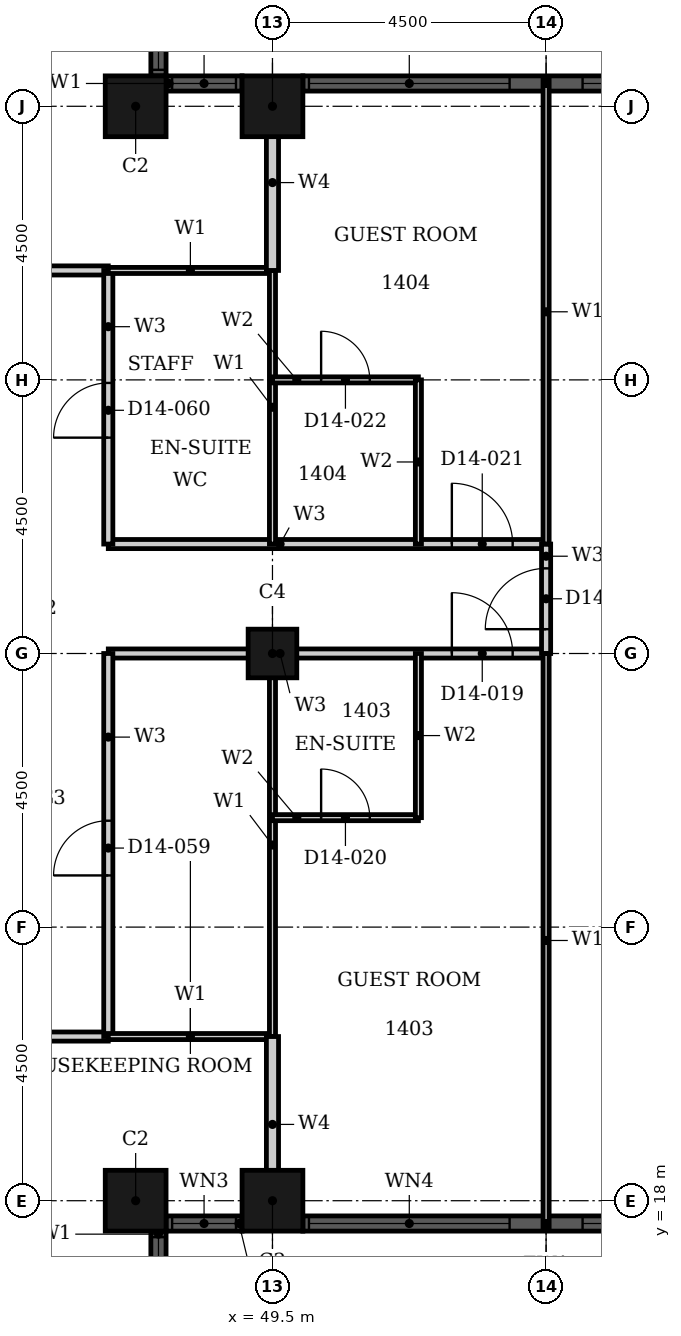
"""IFC4 building model, lengths in metres.
Left out: names, types, materials, properties, quantities, classifications, styles, units other than length and angle.
Written with IfcOpenShell. Run it as: python <this file> out.ifc"""

import sys

from ifc_helpers import new_model, si_unit, direction, frame, frame_2d, origin, origin_2d, place, context, subcontext, project, spatial, rectangle, hollow_rectangle, extrude, element, fill, save


model = new_model("IFC4")
c1 = context("Model", 3, precision=1e-05, world=origin(), true_north=direction((0.0, 1.0)))
c2 = subcontext(c1, "Body", "Model", "MODEL_VIEW")
j1 = project(units=[si_unit("LENGTHUNIT", "METRE"), si_unit("PLANEANGLEUNIT", "RADIAN")], contexts=[c1])
p1 = place(None, origin())
s1 = spatial("IfcSite", under=j1, at=p1, CompositionType="ELEMENT")
p2 = place(p1, origin())
s2 = spatial("IfcBuilding", under=s1, at=p2, CompositionType="ELEMENT")
p3 = place(p2, frame((0.0, 0.0, 63.6)))
s3 = spatial("IfcBuildingStorey", under=s2, at=p3, CompositionType="ELEMENT", Elevation=63.6)
for number, where, z_axis, x_axis in (
    (1, (47.25, 18.0, 0.0), (0.0, 0.0, 1.0), (1.0, 0.0, 0.0)),
    (2, (49.5, 18.0, 0.0), (0.0, 0.0, 1.0), (1.0, 0.0, 0.0)),
    (3, (49.5, 36.0, 0.0), (0.0, 0.0, 1.0), (1.0, 0.0, 0.0)),
    (4, (47.25, 36.0, 0.0), (0.0, 0.0, 1.0), (1.0, 0.0, 0.0)),
):
    element("IfcColumn", number, at=place(p3, frame(where, z_axis=z_axis, x_axis=x_axis)), inside=s3, PredefinedType="COLUMN", context=c2, shape_type="SweptSolid", body=[
        extrude(hollow_rectangle(XDim=1.0, YDim=1.0, WallThickness=0.032, at=origin_2d()), origin(), (0.0, 0.0, 1.0), 3.6),
    ])
p4 = place(p3, frame((49.5, 27.0, 0.0), z_axis=(0.0, 0.0, 1.0), x_axis=(1.0, 0.0, 0.0)))
e5 = element("IfcColumn", 5, at=p4, inside=s3, PredefinedType="COLUMN", context=c2, shape_type="SweptSolid", body=[
    extrude(hollow_rectangle(XDim=0.8, YDim=0.8, WallThickness=0.025, at=origin_2d()), origin(), (0.0, 0.0, 1.0), 3.6),
])
p5 = place(p3, frame((47.625, 16.25, 0.0), z_axis=(0.0, 0.0, 1.0), x_axis=(0.0, 1.0, 0.0)))
e6 = element("IfcWall", 6, at=p5, inside=s3, PredefinedType="SOLIDWALL", context=c2, shape_type="SweptSolid", body=[
    extrude(rectangle(XDim=1.25, YDim=0.25, at=frame_2d((0.625, 0.0))), origin(), (0.0, 0.0, 1.0), 3.6),
])
p6 = place(p5, frame((0.1, 0.0, 0.9)))
e7 = element("IfcOpeningElement", 7, at=p6, cuts=e6, PredefinedType="OPENING", context=c2, shape_type="SweptSolid", body=[
    extrude(rectangle(XDim=1.05, YDim=2.08, at=frame_2d((0.525, 1.04))), frame((0.0, 0.135, 0.0), z_axis=(0.0, -1.0, 0.0), x_axis=(1.0, 0.0, 0.0)), (0.0, 0.0, 1.0), 0.27),
])
p7 = place(p3, frame((47.75, 17.625, 0.0), z_axis=(0.0, 0.0, 1.0), x_axis=(1.0, 0.0, 0.0)))
e8 = element("IfcWall", 8, at=p7, inside=s3, PredefinedType="SOLIDWALL", context=c2, shape_type="SweptSolid", body=[
    extrude(rectangle(XDim=1.25, YDim=0.25, at=frame_2d((0.625, 0.0))), origin(), (0.0, 0.0, 1.0), 3.6),
])
p8 = place(p7, frame((0.1, 0.0, 0.9)))
e9 = element("IfcOpeningElement", 9, at=p8, cuts=e8, PredefinedType="OPENING", context=c2, shape_type="SweptSolid", body=[
    extrude(rectangle(XDim=1.05, YDim=2.08, at=frame_2d((0.525, 1.04))), frame((0.0, 0.135, 0.0), z_axis=(0.0, -1.0, 0.0), x_axis=(1.0, 0.0, 0.0)), (0.0, 0.0, 1.0), 0.27),
])
p9 = place(p3, frame((50.0, 17.625, 0.0), z_axis=(0.0, 0.0, 1.0), x_axis=(1.0, 0.0, 0.0)))
e10 = element("IfcWall", 10, at=p9, inside=s3, PredefinedType="SOLIDWALL", context=c2, shape_type="SweptSolid", body=[
    extrude(rectangle(XDim=8.0, YDim=0.25, at=frame_2d((4.0, 0.0))), origin(), (0.0, 0.0, 1.0), 3.6),
])
p10 = place(p9, frame((0.1, 0.0, 0.9)))
e11 = element("IfcOpeningElement", 11, at=p10, cuts=e10, PredefinedType="OPENING", context=c2, shape_type="SweptSolid", body=[
    extrude(rectangle(XDim=3.3, YDim=2.08, at=frame_2d((1.65, 1.04))), frame((0.0, 0.135, 0.0), z_axis=(0.0, -1.0, 0.0), x_axis=(1.0, 0.0, 0.0)), (0.0, 0.0, 1.0), 0.27),
])
p11 = place(p9, frame((4.6, 0.0, 0.9)))
e12 = element("IfcOpeningElement", 12, at=p11, cuts=e10, PredefinedType="OPENING", context=c2, shape_type="SweptSolid", body=[
    extrude(rectangle(XDim=3.3, YDim=2.08, at=frame_2d((1.65, 1.04))), frame((0.0, 0.135, 0.0), z_axis=(0.0, -1.0, 0.0), x_axis=(1.0, 0.0, 0.0)), (0.0, 0.0, 1.0), 0.27),
])
p12 = place(p3, frame((58.0, 36.375, 0.0), z_axis=(0.0, 0.0, 1.0), x_axis=(-1.0, 0.0, 0.0)))
e13 = element("IfcWall", 13, at=p12, inside=s3, PredefinedType="SOLIDWALL", context=c2, shape_type="SweptSolid", body=[
    extrude(rectangle(XDim=8.0, YDim=0.25, at=frame_2d((4.0, 0.0))), origin(), (0.0, 0.0, 1.0), 3.6),
])
p13 = place(p12, frame((0.1, 0.0, 0.9)))
e14 = element("IfcOpeningElement", 14, at=p13, cuts=e13, PredefinedType="OPENING", context=c2, shape_type="SweptSolid", body=[
    extrude(rectangle(XDim=3.3, YDim=2.08, at=frame_2d((1.65, 1.04))), frame((0.0, 0.135, 0.0), z_axis=(0.0, -1.0, 0.0), x_axis=(1.0, 0.0, 0.0)), (0.0, 0.0, 1.0), 0.27),
])
p14 = place(p12, frame((4.6, 0.0, 0.9)))
e15 = element("IfcOpeningElement", 15, at=p14, cuts=e13, PredefinedType="OPENING", context=c2, shape_type="SweptSolid", body=[
    extrude(rectangle(XDim=3.3, YDim=2.08, at=frame_2d((1.65, 1.04))), frame((0.0, 0.135, 0.0), z_axis=(0.0, -1.0, 0.0), x_axis=(1.0, 0.0, 0.0)), (0.0, 0.0, 1.0), 0.27),
])
p15 = place(p3, frame((49.0, 36.375, 0.0), z_axis=(0.0, 0.0, 1.0), x_axis=(-1.0, 0.0, 0.0)))
e16 = element("IfcWall", 16, at=p15, inside=s3, PredefinedType="SOLIDWALL", context=c2, shape_type="SweptSolid", body=[
    extrude(rectangle(XDim=1.25, YDim=0.25, at=frame_2d((0.625, 0.0))), origin(), (0.0, 0.0, 1.0), 3.6),
])
p16 = place(p15, frame((0.1, 0.0, 0.9)))
e17 = element("IfcOpeningElement", 17, at=p16, cuts=e16, PredefinedType="OPENING", context=c2, shape_type="SweptSolid", body=[
    extrude(rectangle(XDim=1.05, YDim=2.08, at=frame_2d((0.525, 1.04))), frame((0.0, 0.135, 0.0), z_axis=(0.0, -1.0, 0.0), x_axis=(1.0, 0.0, 0.0)), (0.0, 0.0, 1.0), 0.27),
])
p17 = place(p3, frame((47.625, 36.5, 0.0), z_axis=(0.0, 0.0, 1.0), x_axis=(0.0, 1.0, 0.0)))
e18 = element("IfcWall", 18, at=p17, inside=s3, PredefinedType="SOLIDWALL", context=c2, shape_type="SweptSolid", body=[
    extrude(rectangle(XDim=1.25, YDim=0.25, at=frame_2d((0.625, 0.0))), origin(), (0.0, 0.0, 1.0), 3.6),
])
p18 = place(p17, frame((0.1, 0.0, 0.9)))
e19 = element("IfcOpeningElement", 19, at=p18, cuts=e18, PredefinedType="OPENING", context=c2, shape_type="SweptSolid", body=[
    extrude(rectangle(XDim=1.05, YDim=2.08, at=frame_2d((0.525, 1.04))), frame((0.0, 0.135, 0.0), z_axis=(0.0, -1.0, 0.0), x_axis=(1.0, 0.0, 0.0)), (0.0, 0.0, 1.0), 0.27),
])
p19 = place(p3, frame((31.5, 20.7, 0.0), z_axis=(0.0, 0.0, 1.0), x_axis=(1.0, 0.0, 0.0)))
e20 = element("IfcWall", 20, at=p19, inside=s3, PredefinedType="PARTITIONING", context=c2, shape_type="SweptSolid", body=[
    extrude(rectangle(XDim=15.3, YDim=0.15, at=frame_2d((7.65, 0.0))), origin(), (0.0, 0.0, 1.0), 3.3),
])
p20 = place(p19, frame((11.95, 0.0, 0.0)))
e21 = element("IfcOpeningElement", 21, at=p20, cuts=e20, PredefinedType="OPENING", context=c2, shape_type="SweptSolid", body=[
    extrude(rectangle(XDim=1.0, YDim=2.1, at=frame_2d((0.5, 1.05))), frame((0.0, 0.085, 0.0), z_axis=(0.0, -1.0, 0.0), x_axis=(1.0, 0.0, 0.0)), (0.0, 0.0, 1.0), 0.17),
])
p21 = place(p19, frame((4.05, 0.0, 0.0)))
e22 = element("IfcOpeningElement", 22, at=p21, cuts=e20, PredefinedType="OPENING", context=c2, shape_type="SweptSolid", body=[
    extrude(rectangle(XDim=0.9, YDim=2.1, at=frame_2d((0.45, 1.05))), frame((0.0, 0.085, 0.0), z_axis=(0.0, -1.0, 0.0), x_axis=(1.0, 0.0, 0.0)), (0.0, 0.0, 1.0), 0.17),
])
p22 = place(p3, frame((46.8, 27.0, 0.0), z_axis=(0.0, 0.0, 1.0), x_axis=(1.0, 0.0, 0.0)))
e23 = element("IfcWall", 23, at=p22, inside=s3, PredefinedType="PARTITIONING", context=c2, shape_type="SweptSolid", body=[
    extrude(rectangle(XDim=7.2, YDim=0.15, at=frame_2d((3.6, 0.0))), origin(), (0.0, 0.0, 1.0), 2.58),
])
p23 = place(p22, frame((5.65, 0.0, 0.0)))
e24 = element("IfcOpeningElement", 24, at=p23, cuts=e23, PredefinedType="OPENING", context=c2, shape_type="SweptSolid", body=[
    extrude(rectangle(XDim=1.0, YDim=2.1, at=frame_2d((0.5, 1.05))), frame((0.0, 0.085, 0.0), z_axis=(0.0, -1.0, 0.0), x_axis=(1.0, 0.0, 0.0)), (0.0, 0.0, 1.0), 0.17),
])
p24 = place(p3, frame((46.8, 28.8, 0.0), z_axis=(0.0, 0.0, 1.0), x_axis=(1.0, 0.0, 0.0)))
e25 = element("IfcWall", 25, at=p24, inside=s3, PredefinedType="PARTITIONING", context=c2, shape_type="SweptSolid", body=[
    extrude(rectangle(XDim=7.2, YDim=0.15, at=frame_2d((3.6, 0.0))), origin(), (0.0, 0.0, 1.0), 3.3),
])
p25 = place(p24, frame((5.65, 0.0, 0.0)))
e26 = element("IfcOpeningElement", 26, at=p25, cuts=e25, PredefinedType="OPENING", context=c2, shape_type="SweptSolid", body=[
    extrude(rectangle(XDim=1.0, YDim=2.1, at=frame_2d((0.5, 1.05))), frame((0.0, 0.085, 0.0), z_axis=(0.0, -1.0, 0.0), x_axis=(1.0, 0.0, 0.0)), (0.0, 0.0, 1.0), 0.17),
])
p26 = place(p3, frame((33.3, 33.3, 0.0), z_axis=(0.0, 0.0, 1.0), x_axis=(1.0, 0.0, 0.0)))
e27 = element("IfcWall", 27, at=p26, inside=s3, PredefinedType="PARTITIONING", context=c2, shape_type="SweptSolid", body=[
    extrude(rectangle(XDim=13.5, YDim=0.15, at=frame_2d((6.75, 0.0))), origin(), (0.0, 0.0, 1.0), 3.3),
])
p27 = place(p26, frame((10.15, 0.0, 0.0)))
e28 = element("IfcOpeningElement", 28, at=p27, cuts=e27, PredefinedType="OPENING", context=c2, shape_type="SweptSolid", body=[
    extrude(rectangle(XDim=1.0, YDim=2.1, at=frame_2d((0.5, 1.05))), frame((0.0, 0.085, 0.0), z_axis=(0.0, -1.0, 0.0), x_axis=(1.0, 0.0, 0.0)), (0.0, 0.0, 1.0), 0.17),
])
p28 = place(p26, frame((3.15, 0.0, 0.0)))
e29 = element("IfcOpeningElement", 29, at=p28, cuts=e27, PredefinedType="OPENING", context=c2, shape_type="SweptSolid", body=[
    extrude(rectangle(XDim=0.9, YDim=2.1, at=frame_2d((0.45, 1.05))), frame((0.0, 0.085, 0.0), z_axis=(0.0, -1.0, 0.0), x_axis=(1.0, 0.0, 0.0)), (0.0, 0.0, 1.0), 0.17),
])
p29 = place(p3, frame((46.8, 28.8, 0.0), z_axis=(0.0, 0.0, 1.0), x_axis=(0.0, 1.0, 0.0)))
e30 = element("IfcWall", 30, at=p29, inside=s3, PredefinedType="PARTITIONING", context=c2, shape_type="SweptSolid", body=[
    extrude(rectangle(XDim=4.5, YDim=0.15, at=frame_2d((2.25, 0.0))), origin(), (0.0, 0.0, 1.0), 3.3),
])
p30 = place(p29, frame((1.75, 0.0, 0.0)))
e31 = element("IfcOpeningElement", 31, at=p30, cuts=e30, PredefinedType="OPENING", context=c2, shape_type="SweptSolid", body=[
    extrude(rectangle(XDim=0.9, YDim=2.1, at=frame_2d((0.45, 1.05))), frame((0.0, 0.085, 0.0), z_axis=(0.0, -1.0, 0.0), x_axis=(1.0, 0.0, 0.0)), (0.0, 0.0, 1.0), 0.17),
])
p31 = place(p3, frame((46.8, 20.7, 0.0), z_axis=(0.0, 0.0, 1.0), x_axis=(0.0, 1.0, 0.0)))
e32 = element("IfcWall", 32, at=p31, inside=s3, PredefinedType="PARTITIONING", context=c2, shape_type="SweptSolid", body=[
    extrude(rectangle(XDim=6.3, YDim=0.15, at=frame_2d((3.15, 0.0))), origin(), (0.0, 0.0, 1.0), 3.3),
])
p32 = place(p31, frame((2.65, 0.0, 0.0)))
e33 = element("IfcOpeningElement", 33, at=p32, cuts=e32, PredefinedType="OPENING", context=c2, shape_type="SweptSolid", body=[
    extrude(rectangle(XDim=0.9, YDim=2.1, at=frame_2d((0.45, 1.05))), frame((0.0, 0.085, 0.0), z_axis=(0.0, -1.0, 0.0), x_axis=(1.0, 0.0, 0.0)), (0.0, 0.0, 1.0), 0.17),
])
p33 = place(p3, frame((54.0, 27.0, 0.0), z_axis=(0.0, 0.0, 1.0), x_axis=(0.0, 1.0, 0.0)))
e34 = element("IfcWall", 34, at=p33, inside=s3, PredefinedType="PARTITIONING", context=c2, shape_type="SweptSolid", body=[
    extrude(rectangle(XDim=1.8, YDim=0.15, at=frame_2d((0.9, 0.0))), origin(), (0.0, 0.0, 1.0), 3.3),
])
p34 = place(p33, frame((0.4, 0.0, 0.0)))
e35 = element("IfcOpeningElement", 35, at=p34, cuts=e34, PredefinedType="OPENING", context=c2, shape_type="SweptSolid", body=[
    extrude(rectangle(XDim=1.0, YDim=2.1, at=frame_2d((0.5, 1.05))), frame((0.0, 0.085, 0.0), z_axis=(0.0, -1.0, 0.0), x_axis=(1.0, 0.0, 0.0)), (0.0, 0.0, 1.0), 0.17),
])
for number, where, z_axis, x_axis in (
    (36, (46.8, 20.7, 0.0), (0.0, 0.0, 1.0), (1.0, 0.0, 0.0)),
    (37, (46.8, 33.3, 0.0), (0.0, 0.0, 1.0), (1.0, 0.0, 0.0)),
):
    element("IfcWall", number, at=place(p3, frame(where, z_axis=z_axis, x_axis=x_axis)), inside=s3, PredefinedType="PARTITIONING", context=c2, shape_type="SweptSolid", body=[
        extrude(rectangle(XDim=2.7, YDim=0.1, at=frame_2d((1.35, 0.0))), origin(), (0.0, 0.0, 1.0), 3.3),
    ])
p35 = place(p3, frame((49.5, 28.8, 0.0), z_axis=(0.0, 0.0, 1.0), x_axis=(0.0, 1.0, 0.0)))
e38 = element("IfcWall", 38, at=p35, inside=s3, PredefinedType="PARTITIONING", context=c2, shape_type="SweptSolid", body=[
    extrude(rectangle(XDim=4.5, YDim=0.1, at=frame_2d((2.25, 0.0))), origin(), (0.0, 0.0, 1.0), 2.38),
])
p36 = place(p3, frame((49.5, 20.7, 0.0), z_axis=(0.0, 0.0, 1.0), x_axis=(0.0, 1.0, 0.0)))
e39 = element("IfcWall", 39, at=p36, inside=s3, PredefinedType="PARTITIONING", context=c2, shape_type="SweptSolid", body=[
    extrude(rectangle(XDim=6.3, YDim=0.1, at=frame_2d((3.15, 0.0))), origin(), (0.0, 0.0, 1.0), 2.38),
])
p37 = place(p3, frame((54.0, 28.8, 0.0), z_axis=(0.0, 0.0, 1.0), x_axis=(0.0, 1.0, 0.0)))
e40 = element("IfcWall", 40, at=p37, inside=s3, PredefinedType="PARTITIONING", context=c2, shape_type="SweptSolid", body=[
    extrude(rectangle(XDim=7.64, YDim=0.1, at=frame_2d((3.82, 0.0))), origin(), (0.0, 0.0, 1.0), 3.3),
])
p38 = place(p3, frame((54.0, 17.56, 0.0), z_axis=(0.0, 0.0, 1.0), x_axis=(0.0, 1.0, 0.0)))
e41 = element("IfcWall", 41, at=p38, inside=s3, PredefinedType="PARTITIONING", context=c2, shape_type="SweptSolid", body=[
    extrude(rectangle(XDim=9.44, YDim=0.1, at=frame_2d((4.72, 0.0))), origin(), (0.0, 0.0, 1.0), 3.3),
])
for number, where, z_axis, x_axis in (
    (42, (49.5, 33.3, 0.0), (0.0, 0.0, 1.0), (0.0, 1.0, 0.0)),
    (43, (49.5, 17.81, 0.0), (0.0, 0.0, 1.0), (0.0, 1.0, 0.0)),
):
    element("IfcWall", number, at=place(p3, frame(where, z_axis=z_axis, x_axis=x_axis)), inside=s3, PredefinedType="PARTITIONING", context=c2, shape_type="SweptSolid", body=[
        extrude(rectangle(XDim=2.89, YDim=0.2, at=frame_2d((1.445, 0.0))), origin(), (0.0, 0.0, 1.0), 2.38),
    ])
p39 = place(p3, frame((49.5, 24.3, 0.0), z_axis=(0.0, 0.0, 1.0), x_axis=(1.0, 0.0, 0.0)))
e44 = element("IfcWall", 44, at=p39, inside=s3, PredefinedType="PARTITIONING", context=c2, shape_type="SweptSolid", body=[
    extrude(rectangle(XDim=2.4, YDim=0.1, at=frame_2d((1.2, 0.0))), origin(), (0.0, 0.0, 1.0), 3.3),
])
p40 = place(p39, frame((0.8, 0.0, 0.0)))
e45 = element("IfcOpeningElement", 45, at=p40, cuts=e44, PredefinedType="OPENING", context=c2, shape_type="SweptSolid", body=[
    extrude(rectangle(XDim=0.8, YDim=2.1, at=frame_2d((0.4, 1.05))), frame((0.0, 0.06, 0.0), z_axis=(0.0, -1.0, 0.0), x_axis=(1.0, 0.0, 0.0)), (0.0, 0.0, 1.0), 0.12),
])
p41 = place(p3, frame((49.5, 31.5, 0.0), z_axis=(0.0, 0.0, 1.0), x_axis=(1.0, 0.0, 0.0)))
e46 = element("IfcWall", 46, at=p41, inside=s3, PredefinedType="PARTITIONING", context=c2, shape_type="SweptSolid", body=[
    extrude(rectangle(XDim=2.4, YDim=0.1, at=frame_2d((1.2, 0.0))), origin(), (0.0, 0.0, 1.0), 2.58),
])
p42 = place(p41, frame((0.8, 0.0, 0.0)))
e47 = element("IfcOpeningElement", 47, at=p42, cuts=e46, PredefinedType="OPENING", context=c2, shape_type="SweptSolid", body=[
    extrude(rectangle(XDim=0.8, YDim=2.1, at=frame_2d((0.4, 1.05))), frame((0.0, 0.06, 0.0), z_axis=(0.0, -1.0, 0.0), x_axis=(1.0, 0.0, 0.0)), (0.0, 0.0, 1.0), 0.12),
])
for number, where, z_axis, x_axis in (
    (48, (51.9, 28.8, 0.0), (0.0, 0.0, 1.0), (0.0, 1.0, 0.0)),
    (49, (51.9, 24.3, 0.0), (0.0, 0.0, 1.0), (0.0, 1.0, 0.0)),
):
    element("IfcWall", number, at=place(p3, frame(where, z_axis=z_axis, x_axis=x_axis)), inside=s3, PredefinedType="PARTITIONING", context=c2, shape_type="SweptSolid", body=[
        extrude(rectangle(XDim=2.7, YDim=0.1, at=frame_2d((1.35, 0.0))), origin(), (0.0, 0.0, 1.0), 3.3),
    ])
p43 = place(p6, origin())
e50 = element("IfcWindow", 50, at=p43, inside=s3, PartitioningType="SINGLE_PANEL", PredefinedType="WINDOW", context=c2, shape_type="SweptSolid", body=[
    extrude(rectangle(XDim=1.05, YDim=2.08, at=frame_2d((0.525, 1.04))), frame((0.0, 0.03, 0.0), z_axis=(0.0, -1.0, 0.0), x_axis=(1.0, 0.0, 0.0)), (0.0, 0.0, 1.0), 0.06),
])
fill(e7, e50)
p44 = place(p8, origin())
e51 = element("IfcWindow", 51, at=p44, inside=s3, PartitioningType="SINGLE_PANEL", PredefinedType="WINDOW", context=c2, shape_type="SweptSolid", body=[
    extrude(rectangle(XDim=1.05, YDim=2.08, at=frame_2d((0.525, 1.04))), frame((0.0, 0.03, 0.0), z_axis=(0.0, -1.0, 0.0), x_axis=(1.0, 0.0, 0.0)), (0.0, 0.0, 1.0), 0.06),
])
fill(e9, e51)
p45 = place(p10, origin())
e52 = element("IfcWindow", 52, at=p45, inside=s3, PartitioningType="SINGLE_PANEL", PredefinedType="WINDOW", context=c2, shape_type="SweptSolid", body=[
    extrude(rectangle(XDim=3.3, YDim=2.08, at=frame_2d((1.65, 1.04))), frame((0.0, 0.03, 0.0), z_axis=(0.0, -1.0, 0.0), x_axis=(1.0, 0.0, 0.0)), (0.0, 0.0, 1.0), 0.06),
])
fill(e11, e52)
p46 = place(p11, origin())
e53 = element("IfcWindow", 53, at=p46, inside=s3, PartitioningType="SINGLE_PANEL", PredefinedType="WINDOW", context=c2, shape_type="SweptSolid", body=[
    extrude(rectangle(XDim=3.3, YDim=2.08, at=frame_2d((1.65, 1.04))), frame((0.0, 0.03, 0.0), z_axis=(0.0, -1.0, 0.0), x_axis=(1.0, 0.0, 0.0)), (0.0, 0.0, 1.0), 0.06),
])
fill(e12, e53)
p47 = place(p13, origin())
e54 = element("IfcWindow", 54, at=p47, inside=s3, PartitioningType="SINGLE_PANEL", PredefinedType="WINDOW", context=c2, shape_type="SweptSolid", body=[
    extrude(rectangle(XDim=3.3, YDim=2.08, at=frame_2d((1.65, 1.04))), frame((0.0, 0.03, 0.0), z_axis=(0.0, -1.0, 0.0), x_axis=(1.0, 0.0, 0.0)), (0.0, 0.0, 1.0), 0.06),
])
fill(e14, e54)
p48 = place(p14, origin())
e55 = element("IfcWindow", 55, at=p48, inside=s3, PartitioningType="SINGLE_PANEL", PredefinedType="WINDOW", context=c2, shape_type="SweptSolid", body=[
    extrude(rectangle(XDim=3.3, YDim=2.08, at=frame_2d((1.65, 1.04))), frame((0.0, 0.03, 0.0), z_axis=(0.0, -1.0, 0.0), x_axis=(1.0, 0.0, 0.0)), (0.0, 0.0, 1.0), 0.06),
])
fill(e15, e55)
p49 = place(p16, origin())
e56 = element("IfcWindow", 56, at=p49, inside=s3, PartitioningType="SINGLE_PANEL", PredefinedType="WINDOW", context=c2, shape_type="SweptSolid", body=[
    extrude(rectangle(XDim=1.05, YDim=2.08, at=frame_2d((0.525, 1.04))), frame((0.0, 0.03, 0.0), z_axis=(0.0, -1.0, 0.0), x_axis=(1.0, 0.0, 0.0)), (0.0, 0.0, 1.0), 0.06),
])
fill(e17, e56)
p50 = place(p18, origin())
e57 = element("IfcWindow", 57, at=p50, inside=s3, PartitioningType="SINGLE_PANEL", PredefinedType="WINDOW", context=c2, shape_type="SweptSolid", body=[
    extrude(rectangle(XDim=1.05, YDim=2.08, at=frame_2d((0.525, 1.04))), frame((0.0, 0.03, 0.0), z_axis=(0.0, -1.0, 0.0), x_axis=(1.0, 0.0, 0.0)), (0.0, 0.0, 1.0), 0.06),
])
fill(e19, e57)
p51 = place(p23, origin())
e58 = element("IfcDoor", 58, at=p51, inside=s3, OperationType="SINGLE_SWING_RIGHT", PredefinedType="DOOR", context=c2, shape_type="SweptSolid", body=[
    extrude(rectangle(XDim=1.0, YDim=2.1, at=frame_2d((0.5, 1.05))), frame((0.0, 0.025, 0.0), z_axis=(0.0, -1.0, 0.0), x_axis=(1.0, 0.0, 0.0)), (0.0, 0.0, 1.0), 0.05),
])
fill(e24, e58)
p52 = place(p40, origin())
e59 = element("IfcDoor", 59, at=p52, inside=s3, OperationType="SINGLE_SWING_RIGHT", PredefinedType="DOOR", context=c2, shape_type="SweptSolid", body=[
    extrude(rectangle(XDim=0.8, YDim=2.1, at=frame_2d((0.4, 1.05))), frame((0.0, 0.025, 0.0), z_axis=(0.0, -1.0, 0.0), x_axis=(1.0, 0.0, 0.0)), (0.0, 0.0, 1.0), 0.05),
])
fill(e45, e59)
p53 = place(p25, origin())
e60 = element("IfcDoor", 60, at=p53, inside=s3, OperationType="SINGLE_SWING_RIGHT", PredefinedType="DOOR", context=c2, shape_type="SweptSolid", body=[
    extrude(rectangle(XDim=1.0, YDim=2.1, at=frame_2d((0.5, 1.05))), frame((0.0, 0.025, 0.0), z_axis=(0.0, -1.0, 0.0), x_axis=(1.0, 0.0, 0.0)), (0.0, 0.0, 1.0), 0.05),
])
fill(e26, e60)
p54 = place(p42, origin())
e61 = element("IfcDoor", 61, at=p54, inside=s3, OperationType="SINGLE_SWING_RIGHT", PredefinedType="DOOR", context=c2, shape_type="SweptSolid", body=[
    extrude(rectangle(XDim=0.8, YDim=2.1, at=frame_2d((0.4, 1.05))), frame((0.0, 0.025, 0.0), z_axis=(0.0, -1.0, 0.0), x_axis=(1.0, 0.0, 0.0)), (0.0, 0.0, 1.0), 0.05),
])
fill(e47, e61)
p55 = place(p34, origin())
e62 = element("IfcDoor", 62, at=p55, inside=s3, OperationType="SINGLE_SWING_LEFT", PredefinedType="DOOR", context=c2, shape_type="SweptSolid", body=[
    extrude(rectangle(XDim=1.0, YDim=2.1, at=frame_2d((0.5, 1.05))), frame((0.0, 0.025, 0.0), z_axis=(0.0, -1.0, 0.0), x_axis=(1.0, 0.0, 0.0)), (0.0, 0.0, 1.0), 0.05),
])
fill(e35, e62)
p56 = place(p32, origin())
e63 = element("IfcDoor", 63, at=p56, inside=s3, OperationType="SINGLE_SWING_LEFT", PredefinedType="DOOR", context=c2, shape_type="SweptSolid", body=[
    extrude(rectangle(XDim=0.9, YDim=2.1, at=frame_2d((0.45, 1.05))), frame((0.0, 0.025, 0.0), z_axis=(0.0, -1.0, 0.0), x_axis=(1.0, 0.0, 0.0)), (0.0, 0.0, 1.0), 0.05),
])
fill(e33, e63)
p57 = place(p30, origin())
e64 = element("IfcDoor", 64, at=p57, inside=s3, OperationType="SINGLE_SWING_RIGHT", PredefinedType="DOOR", context=c2, shape_type="SweptSolid", body=[
    extrude(rectangle(XDim=0.9, YDim=2.1, at=frame_2d((0.45, 1.05))), frame((0.0, 0.025, 0.0), z_axis=(0.0, -1.0, 0.0), x_axis=(1.0, 0.0, 0.0)), (0.0, 0.0, 1.0), 0.05),
])
fill(e31, e64)
save(model, sys.argv[1])
